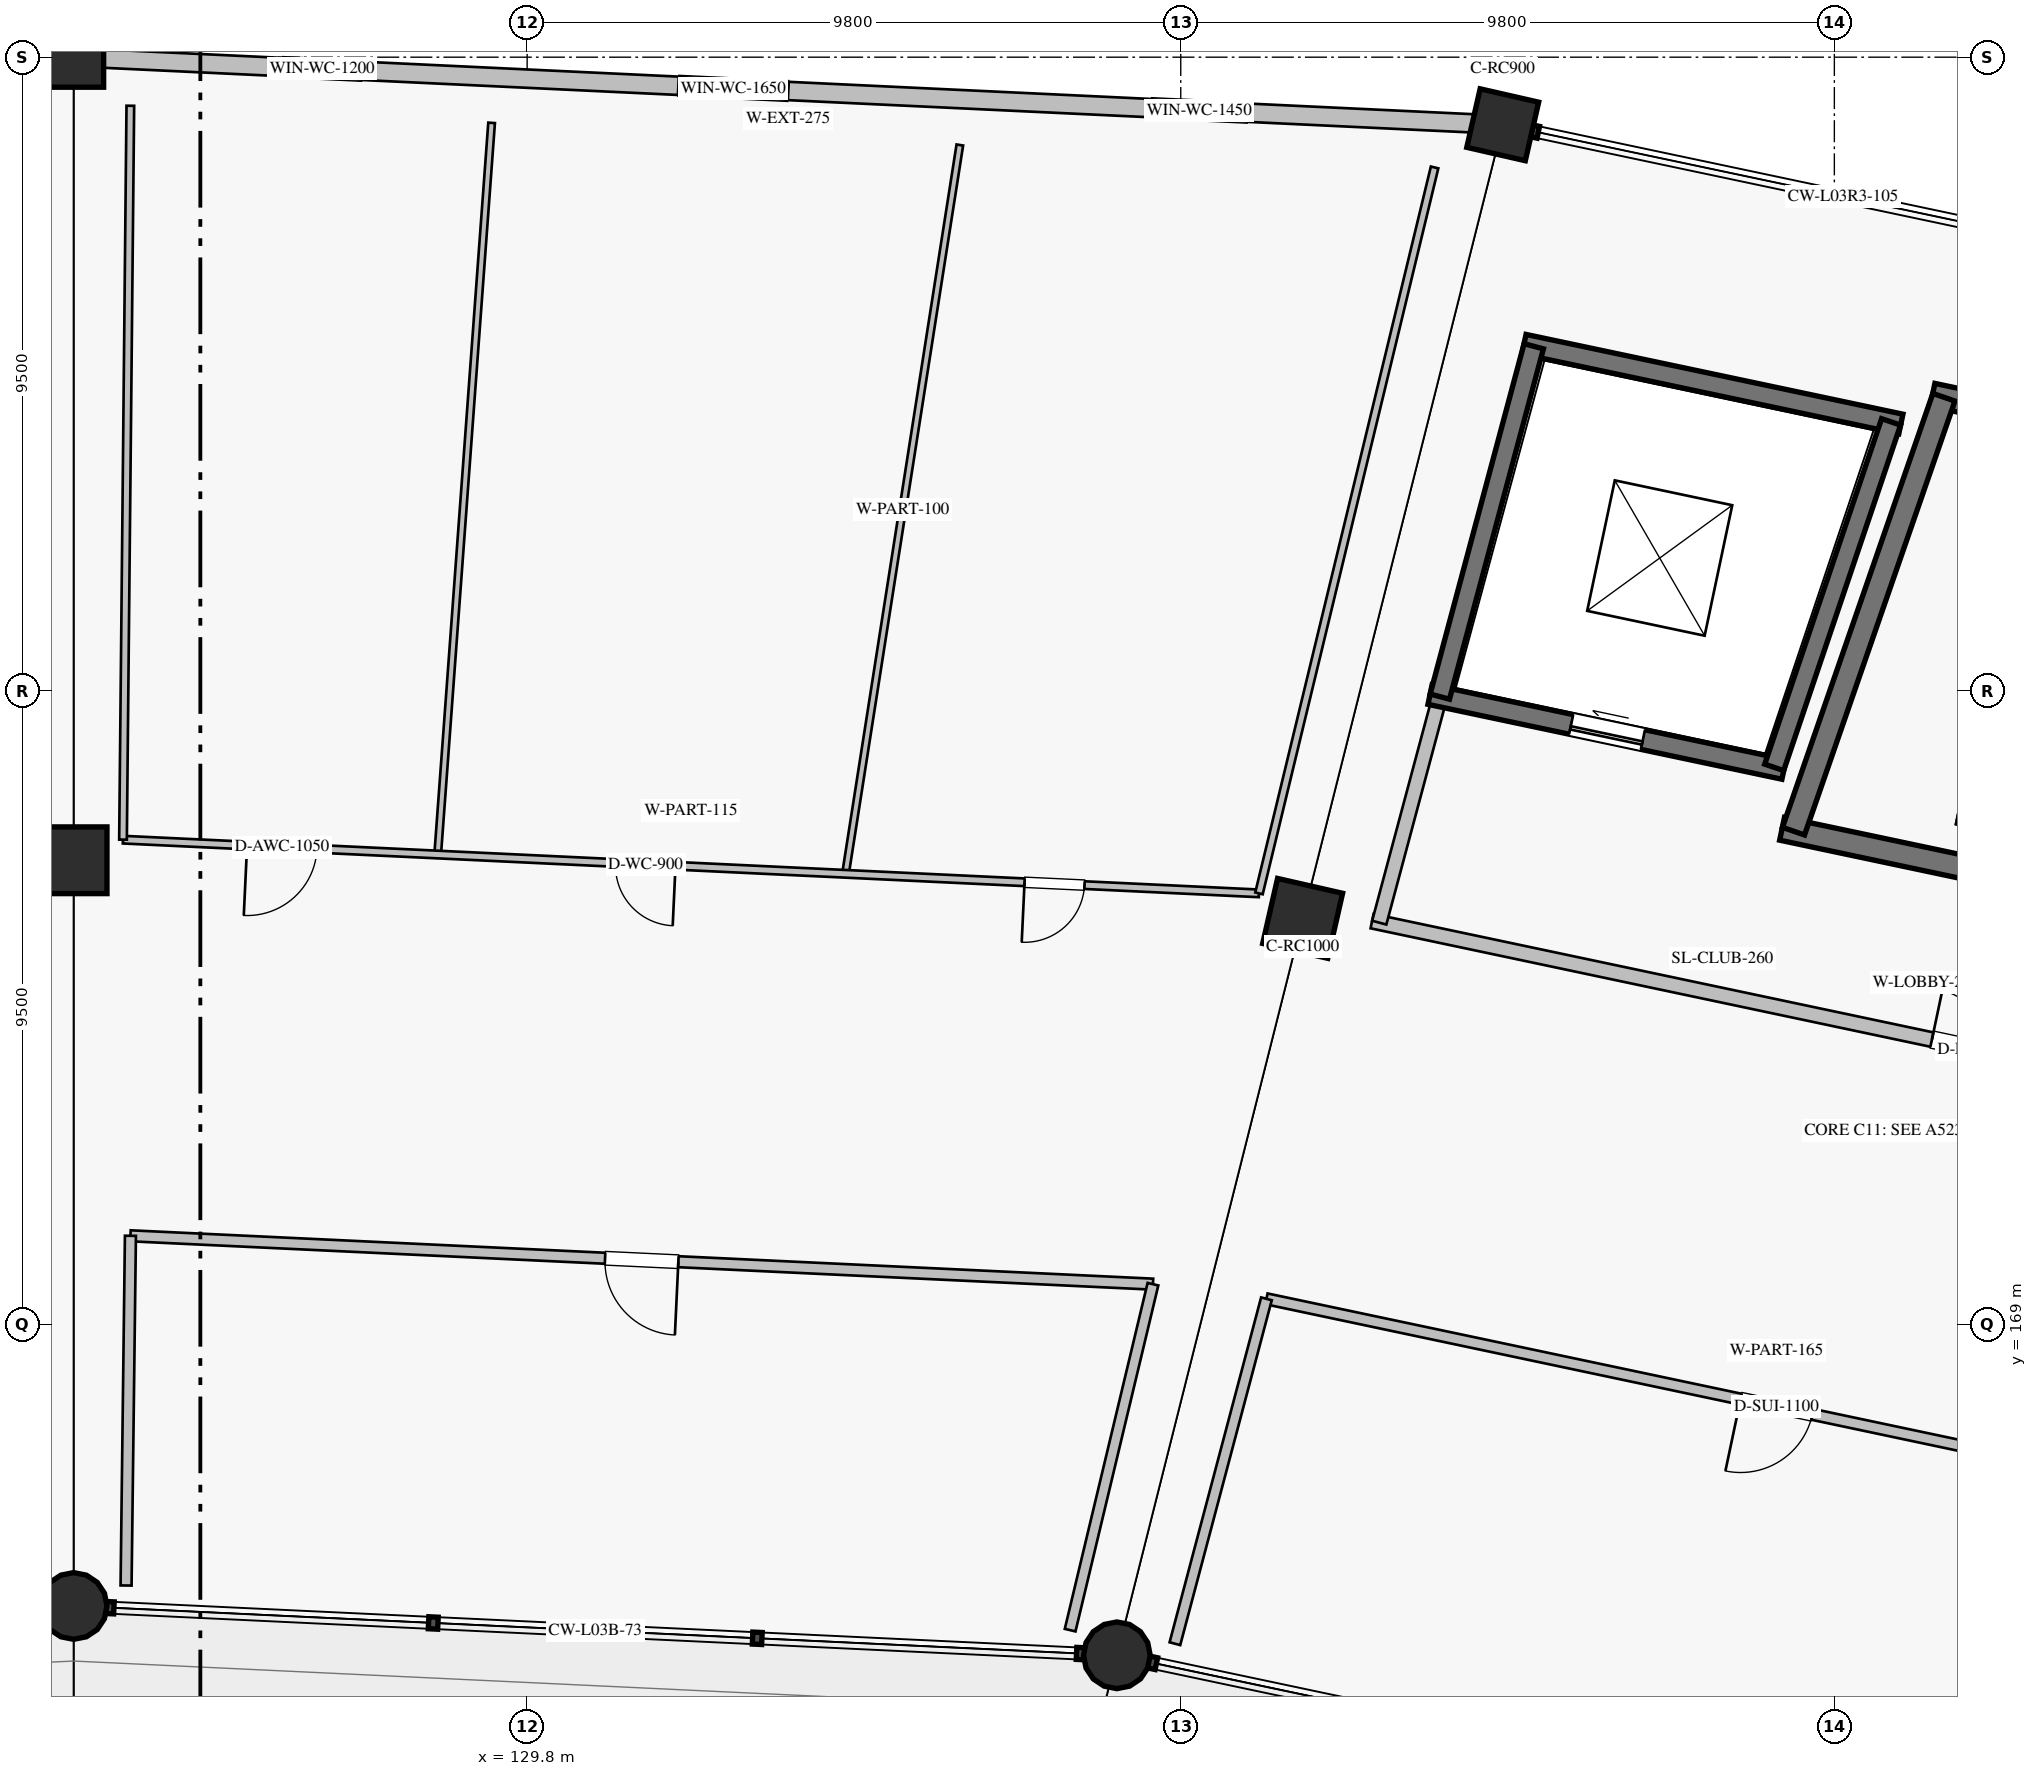
"""IFC4 building model, lengths in metres.
Left out: names, types, materials, properties, quantities, classifications, styles, units other than length and angle.
Written with IfcOpenShell. Run it as: python <this file> out.ifc"""

import sys

from ifc_helpers import new_model, si_unit, direction, frame, frame_2d, origin, origin_2d, place, context, subcontext, project, spatial, rectangle, circle, extrude, element, fill, save


model = new_model("IFC4")
c1 = context("Model", 3, precision=1e-05, world=origin(), true_north=direction((0.0, 1.0)))
c2 = subcontext(c1, "Body", "Model", "MODEL_VIEW")
j1 = project(units=[si_unit("LENGTHUNIT", "METRE"), si_unit("PLANEANGLEUNIT", "RADIAN")], contexts=[c1])
p1 = place(None, origin())
s1 = spatial("IfcSite", under=j1, at=p1, CompositionType="ELEMENT")
p2 = place(p1, origin())
s2 = spatial("IfcBuilding", under=s1, at=p2, CompositionType="ELEMENT")
p3 = place(p2, frame((0.0, 0.0, 15.64)))
s3 = spatial("IfcBuildingStorey", under=s2, at=p3, CompositionType="ELEMENT", Elevation=15.64)
for number, where, z_axis, x_axis in (
    (1, (138.642, 164.04, 0.0), (0.0, 0.0, 1.0), (0.223, 0.975, 0.0)),
    (2, (123.0, 164.78, 0.0), (0.0, 0.0, 1.0), (0.0, 1.0, 0.0)),
):
    element("IfcColumn", number, at=place(p3, frame(where, z_axis=z_axis, x_axis=x_axis)), inside=s3, PredefinedType="COLUMN", context=c2, shape_type="SweptSolid", body=[
        extrude(circle(Radius=0.5, at=origin_2d()), origin(), (0.0, 0.0, 1.0), 4.76),
    ])
for number, where, z_axis, x_axis in (
    (3, (141.428, 175.089, 0.0), (0.0, 0.0, 1.0), (0.223, 0.975, 0.0)),
    (4, (123.0, 175.96, 0.0), (0.0, 0.0, 1.0), (0.0, 1.0, 0.0)),
):
    element("IfcColumn", number, at=place(p3, frame(where, z_axis=z_axis, x_axis=x_axis)), inside=s3, PredefinedType="COLUMN", context=c2, shape_type="SweptSolid", body=[
        extrude(rectangle(XDim=1.0, YDim=1.0, at=origin_2d()), origin(), (0.0, 0.0, 1.0), 4.76),
    ])
for number, where, z_axis, x_axis in (
    (5, (144.428, 186.987, 0.0), (0.0, 0.0, 1.0), (0.223, 0.975, 0.0)),
    (6, (123.0, 188.0, 0.0), (0.0, 0.0, 1.0), (0.0, 1.0, 0.0)),
):
    element("IfcColumn", number, at=place(p3, frame(where, z_axis=z_axis, x_axis=x_axis)), inside=s3, PredefinedType="COLUMN", context=c2, shape_type="SweptSolid", body=[
        extrude(rectangle(XDim=0.9, YDim=0.9, at=origin_2d()), origin(), (0.0, 0.0, 1.0), 4.76),
    ])
p4 = place(p3, frame((143.988, 187.008, 0.0), z_axis=(0.0, 0.0, 1.0), x_axis=(-0.998883870553, 0.047233601901, 0.0)))
e7 = element("IfcWall", 7, at=p4, inside=s3, PredefinedType="SOLIDWALL", context=c2, shape_type="SweptSolid", body=[
    extrude(rectangle(XDim=20.572, YDim=0.275, at=frame_2d((10.286, 0.0))), origin(), (0.0, 0.0, 1.0), 3.81),
])
p5 = place(p4, frame((3.389, 0.0, 1.65)))
e8 = element("IfcOpeningElement", 8, at=p5, cuts=e7, PredefinedType="OPENING", context=c2, shape_type="SweptSolid", body=[
    extrude(rectangle(XDim=1.45, YDim=0.95, at=frame_2d((0.725, 0.475))), frame((0.0, 0.147, 0.0), z_axis=(0.0, -1.0, 0.0), x_axis=(1.0, 0.0, 0.0)), (0.0, 0.0, 1.0), 0.295),
])
p6 = place(p4, frame((10.284, 0.0, 1.65)))
e9 = element("IfcOpeningElement", 9, at=p6, cuts=e7, PredefinedType="OPENING", context=c2, shape_type="SweptSolid", body=[
    extrude(rectangle(XDim=1.65, YDim=1.0, at=frame_2d((0.825, 0.5))), frame((0.0, 0.147, 0.0), z_axis=(0.0, -1.0, 0.0), x_axis=(1.0, 0.0, 0.0)), (0.0, 0.0, 1.0), 0.295),
])
p7 = place(p4, frame((16.68, 0.0, 1.65)))
e10 = element("IfcOpeningElement", 10, at=p7, cuts=e7, PredefinedType="OPENING", context=c2, shape_type="SweptSolid", body=[
    extrude(rectangle(XDim=1.2, YDim=0.9, at=frame_2d((0.6, 0.45))), frame((0.0, 0.147, 0.0), z_axis=(0.0, -1.0, 0.0), x_axis=(1.0, 0.0, 0.0)), (0.0, 0.0, 1.0), 0.295),
])
p8 = place(p3, frame((160.4, 173.94, 0.0), z_axis=(0.0, 0.0, 1.0), x_axis=(-0.978345203961, 0.206979858648, 0.0)))
e11 = element("IfcWall", 11, at=p8, inside=s3, PredefinedType="SHEAR", context=c2, shape_type="SweptSolid", body=[
    extrude(rectangle(XDim=12.044, YDim=0.35, at=frame_2d((6.022, 0.0))), origin(), (0.0, 0.0, 1.0), 4.46),
])
p9 = place(p8, frame((0.475, 0.0, 0.0)))
e12 = element("IfcOpeningElement", 12, at=p9, cuts=e11, PredefinedType="OPENING", context=c2, shape_type="SweptSolid", body=[
    extrude(rectangle(XDim=1.8, YDim=2.2, at=frame_2d((0.9, 1.1))), frame((0.0, 0.185, 0.0), z_axis=(0.0, -1.0, 0.0), x_axis=(1.0, 0.0, 0.0)), (0.0, 0.0, 1.0), 0.37),
])
p10 = place(p3, frame((163.655, 180.233, 0.0), z_axis=(0.0, 0.0, 1.0), x_axis=(-0.978345119536, 0.206980257705, 0.0)))
e13 = element("IfcWall", 13, at=p10, inside=s3, PredefinedType="SHEAR", context=c2, shape_type="SweptSolid", body=[
    extrude(rectangle(XDim=13.067, YDim=0.35, at=frame_2d((6.533, 0.0))), origin(), (0.0, 0.0, 1.0), 4.46),
])
p11 = place(p3, frame((148.787, 176.396, 0.0), z_axis=(0.0, 0.0, 1.0), x_axis=(0.327491724385, 0.944854047173, 0.0)))
e14 = element("IfcWall", 14, at=p11, inside=s3, PredefinedType="SHEAR", context=c2, shape_type="SweptSolid", body=[
    extrude(rectangle(XDim=6.885, YDim=0.35, at=frame_2d((3.443, 0.0))), origin(), (0.0, 0.0, 1.0), 4.46),
])
p12 = place(p3, frame((148.645, 177.322, 0.0), z_axis=(0.0, 0.0, 1.0), x_axis=(-0.978351630878, 0.206949477793, 0.0)))
e15 = element("IfcWall", 15, at=p12, inside=s3, PredefinedType="SHEAR", context=c2, shape_type="SweptSolid", body=[
    extrude(rectangle(XDim=5.424, YDim=0.3, at=frame_2d((2.712, 0.0))), origin(), (0.0, 0.0, 1.0), 4.46),
])
p13 = place(p12, frame((2.162, 0.0, 0.0)))
e16 = element("IfcOpeningElement", 16, at=p13, cuts=e15, PredefinedType="OPENING", context=c2, shape_type="SweptSolid", body=[
    extrude(rectangle(XDim=1.1, YDim=2.2, at=frame_2d((0.55, 1.1))), frame((0.0, 0.16, 0.0), z_axis=(0.0, -1.0, 0.0), x_axis=(1.0, 0.0, 0.0)), (0.0, 0.0, 1.0), 0.32),
])
p14 = place(p3, frame((150.397, 182.501, 0.0), z_axis=(0.0, 0.0, 1.0), x_axis=(-0.978347069901, 0.206971038591, 0.0)))
e17 = element("IfcWall", 17, at=p14, inside=s3, PredefinedType="SHEAR", context=c2, shape_type="SweptSolid", body=[
    extrude(rectangle(XDim=5.776, YDim=0.3, at=frame_2d((2.888, 0.0))), origin(), (0.0, 0.0, 1.0), 4.46),
])
p15 = place(p3, frame((148.498, 177.353, 0.0), z_axis=(0.0, 0.0, 1.0), x_axis=(0.320537624185, 0.947235784523, 0.0)))
e18 = element("IfcWall", 18, at=p15, inside=s3, PredefinedType="SHEAR", context=c2, shape_type="SweptSolid", body=[
    extrude(rectangle(XDim=5.468, YDim=0.3, at=frame_2d((2.734, 0.0))), origin(), (0.0, 0.0, 1.0), 4.46),
])
p16 = place(p3, frame((143.485, 178.413, 0.0), z_axis=(0.0, 0.0, 1.0), x_axis=(0.258958994481, 0.965888316099, 0.0)))
e19 = element("IfcWall", 19, at=p16, inside=s3, PredefinedType="SHEAR", context=c2, shape_type="SweptSolid", body=[
    extrude(rectangle(XDim=5.438, YDim=0.3, at=frame_2d((2.719, 0.0))), origin(), (0.0, 0.0, 1.0), 4.46),
])
p17 = place(p3, frame((159.084, 171.532, 0.0), z_axis=(0.0, 0.0, 1.0), x_axis=(-0.978342313718, 0.206993519678, 0.0)))
e20 = element("IfcWall", 20, at=p17, inside=s3, PredefinedType="SOLIDWALL", context=c2, shape_type="SweptSolid", body=[
    extrude(rectangle(XDim=16.983, YDim=0.22, at=frame_2d((8.492, 0.0))), origin(), (0.0, 0.0, 1.0), 4.46),
])
p18 = place(p17, frame((6.903, 0.0, 0.0)))
e21 = element("IfcOpeningElement", 21, at=p18, cuts=e20, PredefinedType="OPENING", context=c2, shape_type="SweptSolid", body=[
    extrude(rectangle(XDim=1.5, YDim=2.2, at=frame_2d((0.75, 1.1))), frame((0.0, 0.12, 0.0), z_axis=(0.0, -1.0, 0.0), x_axis=(1.0, 0.0, 0.0)), (0.0, 0.0, 1.0), 0.24),
])
p19 = place(p3, frame((142.576, 175.025, 0.0), z_axis=(0.0, 0.0, 1.0), x_axis=(0.258940146037, 0.965893369255, 0.0)))
e22 = element("IfcWall", 22, at=p19, inside=s3, PredefinedType="SOLIDWALL", context=c2, shape_type="SweptSolid", body=[
    extrude(rectangle(XDim=3.508, YDim=0.22, at=frame_2d((1.754, 0.0))), origin(), (0.0, 0.0, 1.0), 4.46),
])
p20 = place(p3, frame((140.773, 175.464, 0.0), z_axis=(0.0, 0.0, 1.0), x_axis=(-0.998883826153, 0.047234540851, 0.0)))
e23 = element("IfcWall", 23, at=p20, inside=s3, PredefinedType="PARTITIONING", context=c2, shape_type="SweptSolid", body=[
    extrude(rectangle(XDim=17.052, YDim=0.115, at=frame_2d((8.526, 0.0))), origin(), (0.0, 0.0, 1.0), 3.78),
])
p21 = place(p20, frame((2.619, 0.0, 0.0)))
e24 = element("IfcOpeningElement", 24, at=p21, cuts=e23, PredefinedType="OPENING", context=c2, shape_type="SweptSolid", body=[
    extrude(rectangle(XDim=0.9, YDim=2.1, at=frame_2d((0.45, 1.05))), frame((0.0, 0.067, 0.0), z_axis=(0.0, -1.0, 0.0), x_axis=(1.0, 0.0, 0.0)), (0.0, 0.0, 1.0), 0.135),
])
p22 = place(p20, frame((8.758, 0.0, 0.0)))
e25 = element("IfcOpeningElement", 25, at=p22, cuts=e23, PredefinedType="OPENING", context=c2, shape_type="SweptSolid", body=[
    extrude(rectangle(XDim=0.9, YDim=2.1, at=frame_2d((0.45, 1.05))), frame((0.0, 0.067, 0.0), z_axis=(0.0, -1.0, 0.0), x_axis=(1.0, 0.0, 0.0)), (0.0, 0.0, 1.0), 0.135),
])
p23 = place(p20, frame((14.139, 0.0, 0.0)))
e26 = element("IfcOpeningElement", 26, at=p23, cuts=e23, PredefinedType="OPENING", context=c2, shape_type="SweptSolid", body=[
    extrude(rectangle(XDim=1.05, YDim=2.1, at=frame_2d((0.525, 1.05))), frame((0.0, 0.067, 0.0), z_axis=(0.0, -1.0, 0.0), x_axis=(1.0, 0.0, 0.0)), (0.0, 0.0, 1.0), 0.135),
])
p24 = place(p3, frame((140.773, 175.464, 0.0), z_axis=(0.0, 0.0, 1.0), x_axis=(0.235146333041, 0.971959979658, 0.0)))
e27 = element("IfcWall", 27, at=p24, inside=s3, PredefinedType="PARTITIONING", context=c2, shape_type="SweptSolid", body=[
    extrude(rectangle(XDim=11.198, YDim=0.115, at=frame_2d((5.599, 0.0))), origin(), (0.0, 0.0, 1.0), 3.78),
])
p25 = place(p3, frame((123.74, 176.269, 0.0), z_axis=(0.0, 0.0, 1.0), x_axis=(0.00998463551, 0.999950152284, 0.0)))
e28 = element("IfcWall", 28, at=p25, inside=s3, PredefinedType="PARTITIONING", context=c2, shape_type="SweptSolid", body=[
    extrude(rectangle(XDim=11.003, YDim=0.115, at=frame_2d((5.501, 0.0))), origin(), (0.0, 0.0, 1.0), 3.78),
])
p26 = place(p3, frame((134.573, 175.757, 0.0), z_axis=(0.0, 0.0, 1.0), x_axis=(0.154999027606, 0.987914622547, 0.0)))
e29 = element("IfcWall", 29, at=p26, inside=s3, PredefinedType="PARTITIONING", context=c2, shape_type="SweptSolid", body=[
    extrude(rectangle(XDim=11.061, YDim=0.1, at=frame_2d((5.53, 0.0))), origin(), (0.0, 0.0, 1.0), 3.78),
])
p27 = place(p3, frame((128.458, 176.046, 0.0), z_axis=(0.0, 0.0, 1.0), x_axis=(0.073511947884, 0.997294336452, 0.0)))
e30 = element("IfcWall", 30, at=p27, inside=s3, PredefinedType="PARTITIONING", context=c2, shape_type="SweptSolid", body=[
    extrude(rectangle(XDim=11.0, YDim=0.1, at=frame_2d((5.5, 0.0))), origin(), (0.0, 0.0, 1.0), 3.78),
])
p28 = place(p3, frame((156.18, 166.149, 0.0), z_axis=(0.0, 0.0, 1.0), x_axis=(-0.978345507247, 0.206978425083, 0.0)))
e31 = element("IfcWall", 31, at=p28, inside=s3, PredefinedType="PARTITIONING", context=c2, shape_type="SweptSolid", body=[
    extrude(rectangle(XDim=15.634, YDim=0.165, at=frame_2d((7.817, 0.0))), origin(), (0.0, 0.0, 1.0), 3.78),
])
p29 = place(p28, frame((7.267, 0.0, 0.0)))
e32 = element("IfcOpeningElement", 32, at=p29, cuts=e31, PredefinedType="OPENING", context=c2, shape_type="SweptSolid", body=[
    extrude(rectangle(XDim=1.1, YDim=2.25, at=frame_2d((0.55, 1.125))), frame((0.0, 0.093, 0.0), z_axis=(0.0, -1.0, 0.0), x_axis=(1.0, 0.0, 0.0)), (0.0, 0.0, 1.0), 0.185),
])
p30 = place(p3, frame((140.885, 169.385, 0.0), z_axis=(0.0, 0.0, 1.0), x_axis=(-0.25653476524, -0.966535004138, 0.0)))
e33 = element("IfcWall", 33, at=p30, inside=s3, PredefinedType="PARTITIONING", context=c2, shape_type="SweptSolid", body=[
    extrude(rectangle(XDim=5.349, YDim=0.165, at=frame_2d((2.675, 0.0))), origin(), (0.0, 0.0, 1.0), 3.78),
])
p31 = place(p3, frame((139.183, 169.605, 0.0), z_axis=(0.0, 0.0, 1.0), x_axis=(-0.99888348783, 0.04724169494, 0.0)))
e34 = element("IfcWall", 34, at=p31, inside=s3, PredefinedType="PARTITIONING", context=c2, shape_type="SweptSolid", body=[
    extrude(rectangle(XDim=15.349, YDim=0.165, at=frame_2d((7.674, 0.0))), origin(), (0.0, 0.0, 1.0), 3.78),
])
p32 = place(p31, frame((7.124, 0.0, 0.0)))
e35 = element("IfcOpeningElement", 35, at=p32, cuts=e34, PredefinedType="OPENING", context=c2, shape_type="SweptSolid", body=[
    extrude(rectangle(XDim=1.1, YDim=2.25, at=frame_2d((0.55, 1.125))), frame((0.0, 0.093, 0.0), z_axis=(0.0, -1.0, 0.0), x_axis=(1.0, 0.0, 0.0)), (0.0, 0.0, 1.0), 0.185),
])
p33 = place(p3, frame((139.183, 169.605, 0.0), z_axis=(0.0, 0.0, 1.0), x_axis=(-0.232841451619, -0.972514708582, 0.0)))
e36 = element("IfcWall", 36, at=p33, inside=s3, PredefinedType="PARTITIONING", context=c2, shape_type="SweptSolid", body=[
    extrude(rectangle(XDim=5.334, YDim=0.165, at=frame_2d((2.667, 0.0))), origin(), (0.0, 0.0, 1.0), 3.78),
])
p34 = place(p3, frame((123.852, 170.33, 0.0), z_axis=(0.0, 0.0, 1.0), x_axis=(-0.012478655792, -0.999922138544, 0.0)))
e37 = element("IfcWall", 37, at=p34, inside=s3, PredefinedType="PARTITIONING", context=c2, shape_type="SweptSolid", body=[
    extrude(rectangle(XDim=5.243, YDim=0.165, at=frame_2d((2.622, 0.0))), origin(), (0.0, 0.0, 1.0), 3.78),
])
p35 = place(p5, origin())
e38 = element("IfcWindow", 38, at=p35, inside=s3, PartitioningType="SINGLE_PANEL", PredefinedType="WINDOW", context=c2, shape_type="SweptSolid", body=[
    extrude(rectangle(XDim=1.45, YDim=0.95, at=frame_2d((0.725, 0.475))), frame((0.0, 0.03, 0.0), z_axis=(0.0, -1.0, 0.0), x_axis=(1.0, 0.0, 0.0)), (0.0, 0.0, 1.0), 0.06),
])
fill(e8, e38)
p36 = place(p6, origin())
e39 = element("IfcWindow", 39, at=p36, inside=s3, PartitioningType="SINGLE_PANEL", PredefinedType="WINDOW", context=c2, shape_type="SweptSolid", body=[
    extrude(rectangle(XDim=1.65, YDim=1.0, at=frame_2d((0.825, 0.5))), frame((0.0, 0.03, 0.0), z_axis=(0.0, -1.0, 0.0), x_axis=(1.0, 0.0, 0.0)), (0.0, 0.0, 1.0), 0.06),
])
fill(e9, e39)
p37 = place(p7, origin())
e40 = element("IfcWindow", 40, at=p37, inside=s3, PartitioningType="SINGLE_PANEL", PredefinedType="WINDOW", context=c2, shape_type="SweptSolid", body=[
    extrude(rectangle(XDim=1.2, YDim=0.9, at=frame_2d((0.6, 0.45))), frame((0.0, 0.03, 0.0), z_axis=(0.0, -1.0, 0.0), x_axis=(1.0, 0.0, 0.0)), (0.0, 0.0, 1.0), 0.06),
])
fill(e10, e40)
p38 = place(p13, origin())
e41 = element("IfcDoor", 41, at=p38, inside=s3, OperationType="SLIDING_TO_RIGHT", PredefinedType="DOOR", context=c2, shape_type="SweptSolid", body=[
    extrude(rectangle(XDim=1.1, YDim=2.2, at=frame_2d((0.55, 1.1))), frame((0.0, 0.025, 0.0), z_axis=(0.0, -1.0, 0.0), x_axis=(1.0, 0.0, 0.0)), (0.0, 0.0, 1.0), 0.05),
])
fill(e16, e41)
p39 = place(p18, frame((1.5, 0.0, 0.0), z_axis=(0.0, 0.0, 1.0), x_axis=(-1.0, 0.0, 0.0)))
e42 = element("IfcDoor", 42, at=p39, inside=s3, OperationType="DOUBLE_DOOR_SINGLE_SWING", PredefinedType="DOOR", context=c2, shape_type="SweptSolid", body=[
    extrude(rectangle(XDim=1.5, YDim=2.2, at=frame_2d((0.75, 1.1))), frame((0.0, 0.025, 0.0), z_axis=(0.0, -1.0, 0.0), x_axis=(1.0, 0.0, 0.0)), (0.0, 0.0, 1.0), 0.05),
])
fill(e21, e42)
p40 = place(p21, origin())
e43 = element("IfcDoor", 43, at=p40, inside=s3, OperationType="SINGLE_SWING_RIGHT", PredefinedType="DOOR", context=c2, shape_type="SweptSolid", body=[
    extrude(rectangle(XDim=0.9, YDim=2.1, at=frame_2d((0.45, 1.05))), frame((0.0, 0.025, 0.0), z_axis=(0.0, -1.0, 0.0), x_axis=(1.0, 0.0, 0.0)), (0.0, 0.0, 1.0), 0.05),
])
fill(e24, e43)
p41 = place(p22, origin())
e44 = element("IfcDoor", 44, at=p41, inside=s3, OperationType="SINGLE_SWING_LEFT", PredefinedType="DOOR", context=c2, shape_type="SweptSolid", body=[
    extrude(rectangle(XDim=0.9, YDim=2.1, at=frame_2d((0.45, 1.05))), frame((0.0, 0.025, 0.0), z_axis=(0.0, -1.0, 0.0), x_axis=(1.0, 0.0, 0.0)), (0.0, 0.0, 1.0), 0.05),
])
fill(e25, e44)
p42 = place(p23, origin())
e45 = element("IfcDoor", 45, at=p42, inside=s3, OperationType="SINGLE_SWING_RIGHT", PredefinedType="DOOR", context=c2, shape_type="SweptSolid", body=[
    extrude(rectangle(XDim=1.05, YDim=2.1, at=frame_2d((0.525, 1.05))), frame((0.0, 0.025, 0.0), z_axis=(0.0, -1.0, 0.0), x_axis=(1.0, 0.0, 0.0)), (0.0, 0.0, 1.0), 0.05),
])
fill(e26, e45)
p43 = place(p29, origin())
e46 = element("IfcDoor", 46, at=p43, inside=s3, OperationType="SINGLE_SWING_RIGHT", PredefinedType="DOOR", context=c2, shape_type="SweptSolid", body=[
    extrude(rectangle(XDim=1.1, YDim=2.25, at=frame_2d((0.55, 1.125))), frame((0.0, 0.025, 0.0), z_axis=(0.0, -1.0, 0.0), x_axis=(1.0, 0.0, 0.0)), (0.0, 0.0, 1.0), 0.05),
])
fill(e32, e46)
p44 = place(p32, origin())
e47 = element("IfcDoor", 47, at=p44, inside=s3, OperationType="SINGLE_SWING_LEFT", PredefinedType="DOOR", context=c2, shape_type="SweptSolid", body=[
    extrude(rectangle(XDim=1.1, YDim=2.25, at=frame_2d((0.55, 1.125))), frame((0.0, 0.025, 0.0), z_axis=(0.0, -1.0, 0.0), x_axis=(1.0, 0.0, 0.0)), (0.0, 0.0, 1.0), 0.05),
])
fill(e35, e47)
save(model, sys.argv[1])
